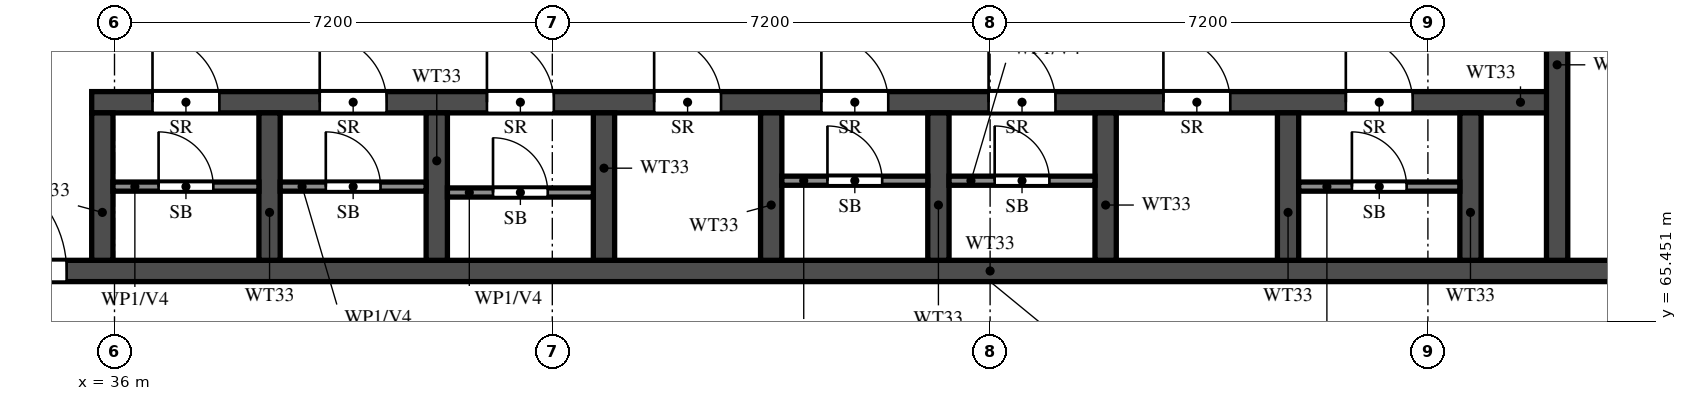
"""IFC4 building model, lengths in metres.
Left out: names, types, materials, properties, quantities, classifications, styles, units other than length and angle.
Written with IfcOpenShell. Run it as: python <this file> out.ifc"""

import sys

from ifc_helpers import new_model, si_unit, direction, frame, frame_2d, origin, place, context, subcontext, project, spatial, rectangle, extrude, element, fill, save


model = new_model("IFC4")
c1 = context("Model", 3, precision=1e-05, world=origin(), true_north=direction((0.0, 1.0)))
c2 = subcontext(c1, "Body", "Model", "MODEL_VIEW")
j1 = project(units=[si_unit("LENGTHUNIT", "METRE"), si_unit("PLANEANGLEUNIT", "RADIAN")], contexts=[c1])
p1 = place(None, origin())
s1 = spatial("IfcSite", under=j1, at=p1, CompositionType="ELEMENT")
p2 = place(p1, origin())
s2 = spatial("IfcBuilding", under=s1, at=p2, CompositionType="ELEMENT")
p3 = place(p2, frame((0.0, 0.0, 202.5)))
s3 = spatial("IfcBuildingStorey", under=s2, at=p3, CompositionType="ELEMENT", Elevation=202.5)
p4 = place(p3, frame((29.7, 66.275, 0.0), z_axis=(0.0, 0.0, 1.0), x_axis=(1.0, 0.0, 0.0)))
e1 = element("IfcWall", 1, at=p4, inside=s3, PredefinedType="SHEAR", context=c2, shape_type="SweptSolid", body=[
    extrude(rectangle(XDim=41.4, YDim=0.35, at=frame_2d((20.7, 0.0))), origin(), (0.0, 0.0, 1.0), 3.1),
])
p5 = place(p4, frame((0.925, 0.0, 0.0)))
e2 = element("IfcOpeningElement", 2, at=p5, cuts=e1, PredefinedType="OPENING", context=c2, shape_type="SweptSolid", body=[
    extrude(rectangle(XDim=1.1, YDim=2.1, at=frame_2d((0.55, 1.05))), frame((0.0, 0.185, 0.0), z_axis=(0.0, -1.0, 0.0), x_axis=(1.0, 0.0, 0.0)), (0.0, 0.0, 1.0), 0.37),
])
p6 = place(p4, frame((3.712, 0.0, 0.0)))
e3 = element("IfcOpeningElement", 3, at=p6, cuts=e1, PredefinedType="OPENING", context=c2, shape_type="SweptSolid", body=[
    extrude(rectangle(XDim=1.8, YDim=2.1, at=frame_2d((0.9, 1.05))), frame((0.0, 0.185, 0.0), z_axis=(0.0, -1.0, 0.0), x_axis=(1.0, 0.0, 0.0)), (0.0, 0.0, 1.0), 0.37),
])
p7 = place(p3, frame((35.625, 69.05, 0.0), z_axis=(0.0, 0.0, 1.0), x_axis=(1.0, 0.0, 0.0)))
e4 = element("IfcWall", 4, at=p7, inside=s3, PredefinedType="SHEAR", context=c2, shape_type="SweptSolid", body=[
    extrude(rectangle(XDim=24.1, YDim=0.35, at=frame_2d((12.05, 0.0))), origin(), (0.0, 0.0, 1.0), 3.1),
])
p8 = place(p7, frame((1.0, 0.0, 0.0)))
e5 = element("IfcOpeningElement", 5, at=p8, cuts=e4, PredefinedType="OPENING", context=c2, shape_type="SweptSolid", body=[
    extrude(rectangle(XDim=1.1, YDim=2.1, at=frame_2d((0.55, 1.05))), frame((0.0, 0.185, 0.0), z_axis=(0.0, -1.0, 0.0), x_axis=(1.0, 0.0, 0.0)), (0.0, 0.0, 1.0), 0.37),
])
p9 = place(p7, frame((3.75, 0.0, 0.0)))
e6 = element("IfcOpeningElement", 6, at=p9, cuts=e4, PredefinedType="OPENING", context=c2, shape_type="SweptSolid", body=[
    extrude(rectangle(XDim=1.1, YDim=2.1, at=frame_2d((0.55, 1.05))), frame((0.0, 0.185, 0.0), z_axis=(0.0, -1.0, 0.0), x_axis=(1.0, 0.0, 0.0)), (0.0, 0.0, 1.0), 0.37),
])
p10 = place(p7, frame((6.5, 0.0, 0.0)))
e7 = element("IfcOpeningElement", 7, at=p10, cuts=e4, PredefinedType="OPENING", context=c2, shape_type="SweptSolid", body=[
    extrude(rectangle(XDim=1.1, YDim=2.1, at=frame_2d((0.55, 1.05))), frame((0.0, 0.185, 0.0), z_axis=(0.0, -1.0, 0.0), x_axis=(1.0, 0.0, 0.0)), (0.0, 0.0, 1.0), 0.37),
])
p11 = place(p7, frame((9.25, 0.0, 0.0)))
e8 = element("IfcOpeningElement", 8, at=p11, cuts=e4, PredefinedType="OPENING", context=c2, shape_type="SweptSolid", body=[
    extrude(rectangle(XDim=1.1, YDim=2.1, at=frame_2d((0.55, 1.05))), frame((0.0, 0.185, 0.0), z_axis=(0.0, -1.0, 0.0), x_axis=(1.0, 0.0, 0.0)), (0.0, 0.0, 1.0), 0.37),
])
p12 = place(p7, frame((12.0, 0.0, 0.0)))
e9 = element("IfcOpeningElement", 9, at=p12, cuts=e4, PredefinedType="OPENING", context=c2, shape_type="SweptSolid", body=[
    extrude(rectangle(XDim=1.1, YDim=2.1, at=frame_2d((0.55, 1.05))), frame((0.0, 0.185, 0.0), z_axis=(0.0, -1.0, 0.0), x_axis=(1.0, 0.0, 0.0)), (0.0, 0.0, 1.0), 0.37),
])
p13 = place(p7, frame((14.75, 0.0, 0.0)))
e10 = element("IfcOpeningElement", 10, at=p13, cuts=e4, PredefinedType="OPENING", context=c2, shape_type="SweptSolid", body=[
    extrude(rectangle(XDim=1.1, YDim=2.1, at=frame_2d((0.55, 1.05))), frame((0.0, 0.185, 0.0), z_axis=(0.0, -1.0, 0.0), x_axis=(1.0, 0.0, 0.0)), (0.0, 0.0, 1.0), 0.37),
])
p14 = place(p7, frame((17.625, 0.0, 0.0)))
e11 = element("IfcOpeningElement", 11, at=p14, cuts=e4, PredefinedType="OPENING", context=c2, shape_type="SweptSolid", body=[
    extrude(rectangle(XDim=1.1, YDim=2.1, at=frame_2d((0.55, 1.05))), frame((0.0, 0.185, 0.0), z_axis=(0.0, -1.0, 0.0), x_axis=(1.0, 0.0, 0.0)), (0.0, 0.0, 1.0), 0.37),
])
p15 = place(p7, frame((20.625, 0.0, 0.0)))
e12 = element("IfcOpeningElement", 12, at=p15, cuts=e4, PredefinedType="OPENING", context=c2, shape_type="SweptSolid", body=[
    extrude(rectangle(XDim=1.1, YDim=2.1, at=frame_2d((0.55, 1.05))), frame((0.0, 0.185, 0.0), z_axis=(0.0, -1.0, 0.0), x_axis=(1.0, 0.0, 0.0)), (0.0, 0.0, 1.0), 0.37),
])
p16 = place(p3, frame((59.725, 66.45, 0.0), z_axis=(0.0, 0.0, 1.0), x_axis=(0.0, 1.0, 0.0)))
e13 = element("IfcWall", 13, at=p16, inside=s3, PredefinedType="SHEAR", context=c2, shape_type="SweptSolid", body=[
    extrude(rectangle(XDim=6.125, YDim=0.35, at=frame_2d((3.062, 0.0))), origin(), (0.0, 0.0, 1.0), 3.1),
])
p17 = place(p16, frame((3.85, 0.0, 0.0)))
e14 = element("IfcOpeningElement", 14, at=p17, cuts=e13, PredefinedType="OPENING", context=c2, shape_type="SweptSolid", body=[
    extrude(rectangle(XDim=1.2, YDim=2.1, at=frame_2d((0.6, 1.05))), frame((0.0, 0.185, 0.0), z_axis=(0.0, -1.0, 0.0), x_axis=(1.0, 0.0, 0.0)), (0.0, 0.0, 1.0), 0.37),
])
for number, where, z_axis, x_axis in (
    (15, (35.8, 66.45, 0.0), (0.0, 0.0, 1.0), (0.0, 1.0, 0.0)),
    (16, (38.55, 66.45, 0.0), (0.0, 0.0, 1.0), (0.0, 1.0, 0.0)),
    (17, (41.3, 66.45, 0.0), (0.0, 0.0, 1.0), (0.0, 1.0, 0.0)),
    (18, (44.05, 66.45, 0.0), (0.0, 0.0, 1.0), (0.0, 1.0, 0.0)),
    (19, (46.8, 66.45, 0.0), (0.0, 0.0, 1.0), (0.0, 1.0, 0.0)),
    (20, (49.55, 66.45, 0.0), (0.0, 0.0, 1.0), (0.0, 1.0, 0.0)),
    (21, (52.3, 66.45, 0.0), (0.0, 0.0, 1.0), (0.0, 1.0, 0.0)),
    (22, (55.3, 66.45, 0.0), (0.0, 0.0, 1.0), (0.0, 1.0, 0.0)),
    (23, (58.3, 66.45, 0.0), (0.0, 0.0, 1.0), (0.0, 1.0, 0.0)),
):
    element("IfcWall", number, at=place(p3, frame(where, z_axis=z_axis, x_axis=x_axis)), inside=s3, PredefinedType="SHEAR", context=c2, shape_type="SweptSolid", body=[
        extrude(rectangle(XDim=2.425, YDim=0.35, at=frame_2d((1.212, 0.0))), origin(), (0.0, 0.0, 1.0), 3.1),
    ])
p18 = place(p3, frame((35.975, 67.663, 0.0), z_axis=(0.0, 0.0, 1.0), x_axis=(1.0, 0.0, 0.0)))
e24 = element("IfcWall", 24, at=p18, inside=s3, PredefinedType="PARTITIONING", context=c2, shape_type="SweptSolid", body=[
    extrude(rectangle(XDim=2.4, YDim=0.15, at=frame_2d((1.2, 0.0))), origin(), (0.0, 0.0, 1.0), 3.1),
])
p19 = place(p18, frame((0.75, 0.0, 0.0)))
e25 = element("IfcOpeningElement", 25, at=p19, cuts=e24, PredefinedType="OPENING", context=c2, shape_type="SweptSolid", body=[
    extrude(rectangle(XDim=0.9, YDim=2.1, at=frame_2d((0.45, 1.05))), frame((0.0, 0.085, 0.0), z_axis=(0.0, -1.0, 0.0), x_axis=(1.0, 0.0, 0.0)), (0.0, 0.0, 1.0), 0.17),
])
p20 = place(p3, frame((38.725, 67.663, 0.0), z_axis=(0.0, 0.0, 1.0), x_axis=(1.0, 0.0, 0.0)))
e26 = element("IfcWall", 26, at=p20, inside=s3, PredefinedType="PARTITIONING", context=c2, shape_type="SweptSolid", body=[
    extrude(rectangle(XDim=2.4, YDim=0.15, at=frame_2d((1.2, 0.0))), origin(), (0.0, 0.0, 1.0), 3.1),
])
p21 = place(p20, frame((0.75, 0.0, 0.0)))
e27 = element("IfcOpeningElement", 27, at=p21, cuts=e26, PredefinedType="OPENING", context=c2, shape_type="SweptSolid", body=[
    extrude(rectangle(XDim=0.9, YDim=2.1, at=frame_2d((0.45, 1.05))), frame((0.0, 0.085, 0.0), z_axis=(0.0, -1.0, 0.0), x_axis=(1.0, 0.0, 0.0)), (0.0, 0.0, 1.0), 0.17),
])
p22 = place(p3, frame((41.475, 67.565, 0.0), z_axis=(0.0, 0.0, 1.0), x_axis=(1.0, 0.0, 0.0)))
e28 = element("IfcWall", 28, at=p22, inside=s3, PredefinedType="PARTITIONING", context=c2, shape_type="SweptSolid", body=[
    extrude(rectangle(XDim=2.4, YDim=0.15, at=frame_2d((1.2, 0.0))), origin(), (0.0, 0.0, 1.0), 3.1),
])
p23 = place(p22, frame((0.75, 0.0, 0.0)))
e29 = element("IfcOpeningElement", 29, at=p23, cuts=e28, PredefinedType="OPENING", context=c2, shape_type="SweptSolid", body=[
    extrude(rectangle(XDim=0.9, YDim=2.1, at=frame_2d((0.45, 1.05))), frame((0.0, 0.085, 0.0), z_axis=(0.0, -1.0, 0.0), x_axis=(1.0, 0.0, 0.0)), (0.0, 0.0, 1.0), 0.17),
])
p24 = place(p3, frame((46.975, 67.76, 0.0), z_axis=(0.0, 0.0, 1.0), x_axis=(1.0, 0.0, 0.0)))
e30 = element("IfcWall", 30, at=p24, inside=s3, PredefinedType="PARTITIONING", context=c2, shape_type="SweptSolid", body=[
    extrude(rectangle(XDim=2.4, YDim=0.15, at=frame_2d((1.2, 0.0))), origin(), (0.0, 0.0, 1.0), 3.1),
])
p25 = place(p24, frame((0.75, 0.0, 0.0)))
e31 = element("IfcOpeningElement", 31, at=p25, cuts=e30, PredefinedType="OPENING", context=c2, shape_type="SweptSolid", body=[
    extrude(rectangle(XDim=0.9, YDim=2.1, at=frame_2d((0.45, 1.05))), frame((0.0, 0.085, 0.0), z_axis=(0.0, -1.0, 0.0), x_axis=(1.0, 0.0, 0.0)), (0.0, 0.0, 1.0), 0.17),
])
p26 = place(p3, frame((49.725, 67.76, 0.0), z_axis=(0.0, 0.0, 1.0), x_axis=(1.0, 0.0, 0.0)))
e32 = element("IfcWall", 32, at=p26, inside=s3, PredefinedType="PARTITIONING", context=c2, shape_type="SweptSolid", body=[
    extrude(rectangle(XDim=2.4, YDim=0.15, at=frame_2d((1.2, 0.0))), origin(), (0.0, 0.0, 1.0), 3.1),
])
p27 = place(p26, frame((0.75, 0.0, 0.0)))
e33 = element("IfcOpeningElement", 33, at=p27, cuts=e32, PredefinedType="OPENING", context=c2, shape_type="SweptSolid", body=[
    extrude(rectangle(XDim=0.9, YDim=2.1, at=frame_2d((0.45, 1.05))), frame((0.0, 0.085, 0.0), z_axis=(0.0, -1.0, 0.0), x_axis=(1.0, 0.0, 0.0)), (0.0, 0.0, 1.0), 0.17),
])
p28 = place(p3, frame((55.475, 67.663, 0.0), z_axis=(0.0, 0.0, 1.0), x_axis=(1.0, 0.0, 0.0)))
e34 = element("IfcWall", 34, at=p28, inside=s3, PredefinedType="PARTITIONING", context=c2, shape_type="SweptSolid", body=[
    extrude(rectangle(XDim=2.65, YDim=0.15, at=frame_2d((1.325, 0.0))), origin(), (0.0, 0.0, 1.0), 3.1),
])
p29 = place(p28, frame((0.875, 0.0, 0.0)))
e35 = element("IfcOpeningElement", 35, at=p29, cuts=e34, PredefinedType="OPENING", context=c2, shape_type="SweptSolid", body=[
    extrude(rectangle(XDim=0.9, YDim=2.1, at=frame_2d((0.45, 1.05))), frame((0.0, 0.085, 0.0), z_axis=(0.0, -1.0, 0.0), x_axis=(1.0, 0.0, 0.0)), (0.0, 0.0, 1.0), 0.17),
])
p30 = place(p6, origin())
e36 = element("IfcDoor", 36, at=p30, inside=s3, OperationType="DOUBLE_DOOR_SINGLE_SWING", PredefinedType="DOOR", context=c2, shape_type="SweptSolid", body=[
    extrude(rectangle(XDim=1.8, YDim=2.1, at=frame_2d((0.9, 1.05))), frame((0.0, 0.025, 0.0), z_axis=(0.0, -1.0, 0.0), x_axis=(1.0, 0.0, 0.0)), (0.0, 0.0, 1.0), 0.05),
])
fill(e3, e36)
p31 = place(p8, origin())
e37 = element("IfcDoor", 37, at=p31, inside=s3, OperationType="SINGLE_SWING_RIGHT", PredefinedType="DOOR", context=c2, shape_type="SweptSolid", body=[
    extrude(rectangle(XDim=1.1, YDim=2.1, at=frame_2d((0.55, 1.05))), frame((0.0, 0.025, 0.0), z_axis=(0.0, -1.0, 0.0), x_axis=(1.0, 0.0, 0.0)), (0.0, 0.0, 1.0), 0.05),
])
fill(e5, e37)
p32 = place(p19, origin())
e38 = element("IfcDoor", 38, at=p32, inside=s3, OperationType="SINGLE_SWING_RIGHT", PredefinedType="DOOR", context=c2, shape_type="SweptSolid", body=[
    extrude(rectangle(XDim=0.9, YDim=2.1, at=frame_2d((0.45, 1.05))), frame((0.0, 0.025, 0.0), z_axis=(0.0, -1.0, 0.0), x_axis=(1.0, 0.0, 0.0)), (0.0, 0.0, 1.0), 0.05),
])
fill(e25, e38)
p33 = place(p9, origin())
e39 = element("IfcDoor", 39, at=p33, inside=s3, OperationType="SINGLE_SWING_LEFT", PredefinedType="DOOR", context=c2, shape_type="SweptSolid", body=[
    extrude(rectangle(XDim=1.1, YDim=2.1, at=frame_2d((0.55, 1.05))), frame((0.0, 0.025, 0.0), z_axis=(0.0, -1.0, 0.0), x_axis=(1.0, 0.0, 0.0)), (0.0, 0.0, 1.0), 0.05),
])
fill(e6, e39)
p34 = place(p21, origin())
e40 = element("IfcDoor", 40, at=p34, inside=s3, OperationType="SINGLE_SWING_LEFT", PredefinedType="DOOR", context=c2, shape_type="SweptSolid", body=[
    extrude(rectangle(XDim=0.9, YDim=2.1, at=frame_2d((0.45, 1.05))), frame((0.0, 0.025, 0.0), z_axis=(0.0, -1.0, 0.0), x_axis=(1.0, 0.0, 0.0)), (0.0, 0.0, 1.0), 0.05),
])
fill(e27, e40)
p35 = place(p10, origin())
e41 = element("IfcDoor", 41, at=p35, inside=s3, OperationType="SINGLE_SWING_RIGHT", PredefinedType="DOOR", context=c2, shape_type="SweptSolid", body=[
    extrude(rectangle(XDim=1.1, YDim=2.1, at=frame_2d((0.55, 1.05))), frame((0.0, 0.025, 0.0), z_axis=(0.0, -1.0, 0.0), x_axis=(1.0, 0.0, 0.0)), (0.0, 0.0, 1.0), 0.05),
])
fill(e7, e41)
p36 = place(p23, origin())
e42 = element("IfcDoor", 42, at=p36, inside=s3, OperationType="SINGLE_SWING_RIGHT", PredefinedType="DOOR", context=c2, shape_type="SweptSolid", body=[
    extrude(rectangle(XDim=0.9, YDim=2.1, at=frame_2d((0.45, 1.05))), frame((0.0, 0.025, 0.0), z_axis=(0.0, -1.0, 0.0), x_axis=(1.0, 0.0, 0.0)), (0.0, 0.0, 1.0), 0.05),
])
fill(e29, e42)
p37 = place(p11, origin())
e43 = element("IfcDoor", 43, at=p37, inside=s3, OperationType="SINGLE_SWING_LEFT", PredefinedType="DOOR", context=c2, shape_type="SweptSolid", body=[
    extrude(rectangle(XDim=1.1, YDim=2.1, at=frame_2d((0.55, 1.05))), frame((0.0, 0.025, 0.0), z_axis=(0.0, -1.0, 0.0), x_axis=(1.0, 0.0, 0.0)), (0.0, 0.0, 1.0), 0.05),
])
fill(e8, e43)
p38 = place(p12, origin())
e44 = element("IfcDoor", 44, at=p38, inside=s3, OperationType="SINGLE_SWING_RIGHT", PredefinedType="DOOR", context=c2, shape_type="SweptSolid", body=[
    extrude(rectangle(XDim=1.1, YDim=2.1, at=frame_2d((0.55, 1.05))), frame((0.0, 0.025, 0.0), z_axis=(0.0, -1.0, 0.0), x_axis=(1.0, 0.0, 0.0)), (0.0, 0.0, 1.0), 0.05),
])
fill(e9, e44)
p39 = place(p25, origin())
e45 = element("IfcDoor", 45, at=p39, inside=s3, OperationType="SINGLE_SWING_LEFT", PredefinedType="DOOR", context=c2, shape_type="SweptSolid", body=[
    extrude(rectangle(XDim=0.9, YDim=2.1, at=frame_2d((0.45, 1.05))), frame((0.0, 0.025, 0.0), z_axis=(0.0, -1.0, 0.0), x_axis=(1.0, 0.0, 0.0)), (0.0, 0.0, 1.0), 0.05),
])
fill(e31, e45)
p40 = place(p13, origin())
e46 = element("IfcDoor", 46, at=p40, inside=s3, OperationType="SINGLE_SWING_LEFT", PredefinedType="DOOR", context=c2, shape_type="SweptSolid", body=[
    extrude(rectangle(XDim=1.1, YDim=2.1, at=frame_2d((0.55, 1.05))), frame((0.0, 0.025, 0.0), z_axis=(0.0, -1.0, 0.0), x_axis=(1.0, 0.0, 0.0)), (0.0, 0.0, 1.0), 0.05),
])
fill(e10, e46)
p41 = place(p27, origin())
e47 = element("IfcDoor", 47, at=p41, inside=s3, OperationType="SINGLE_SWING_RIGHT", PredefinedType="DOOR", context=c2, shape_type="SweptSolid", body=[
    extrude(rectangle(XDim=0.9, YDim=2.1, at=frame_2d((0.45, 1.05))), frame((0.0, 0.025, 0.0), z_axis=(0.0, -1.0, 0.0), x_axis=(1.0, 0.0, 0.0)), (0.0, 0.0, 1.0), 0.05),
])
fill(e33, e47)
p42 = place(p14, origin())
e48 = element("IfcDoor", 48, at=p42, inside=s3, OperationType="SINGLE_SWING_RIGHT", PredefinedType="DOOR", context=c2, shape_type="SweptSolid", body=[
    extrude(rectangle(XDim=1.1, YDim=2.1, at=frame_2d((0.55, 1.05))), frame((0.0, 0.025, 0.0), z_axis=(0.0, -1.0, 0.0), x_axis=(1.0, 0.0, 0.0)), (0.0, 0.0, 1.0), 0.05),
])
fill(e11, e48)
p43 = place(p15, origin())
e49 = element("IfcDoor", 49, at=p43, inside=s3, OperationType="SINGLE_SWING_RIGHT", PredefinedType="DOOR", context=c2, shape_type="SweptSolid", body=[
    extrude(rectangle(XDim=1.1, YDim=2.1, at=frame_2d((0.55, 1.05))), frame((0.0, 0.025, 0.0), z_axis=(0.0, -1.0, 0.0), x_axis=(1.0, 0.0, 0.0)), (0.0, 0.0, 1.0), 0.05),
])
fill(e12, e49)
p44 = place(p29, origin())
e50 = element("IfcDoor", 50, at=p44, inside=s3, OperationType="SINGLE_SWING_LEFT", PredefinedType="DOOR", context=c2, shape_type="SweptSolid", body=[
    extrude(rectangle(XDim=0.9, YDim=2.1, at=frame_2d((0.45, 1.05))), frame((0.0, 0.025, 0.0), z_axis=(0.0, -1.0, 0.0), x_axis=(1.0, 0.0, 0.0)), (0.0, 0.0, 1.0), 0.05),
])
fill(e35, e50)
save(model, sys.argv[1])
